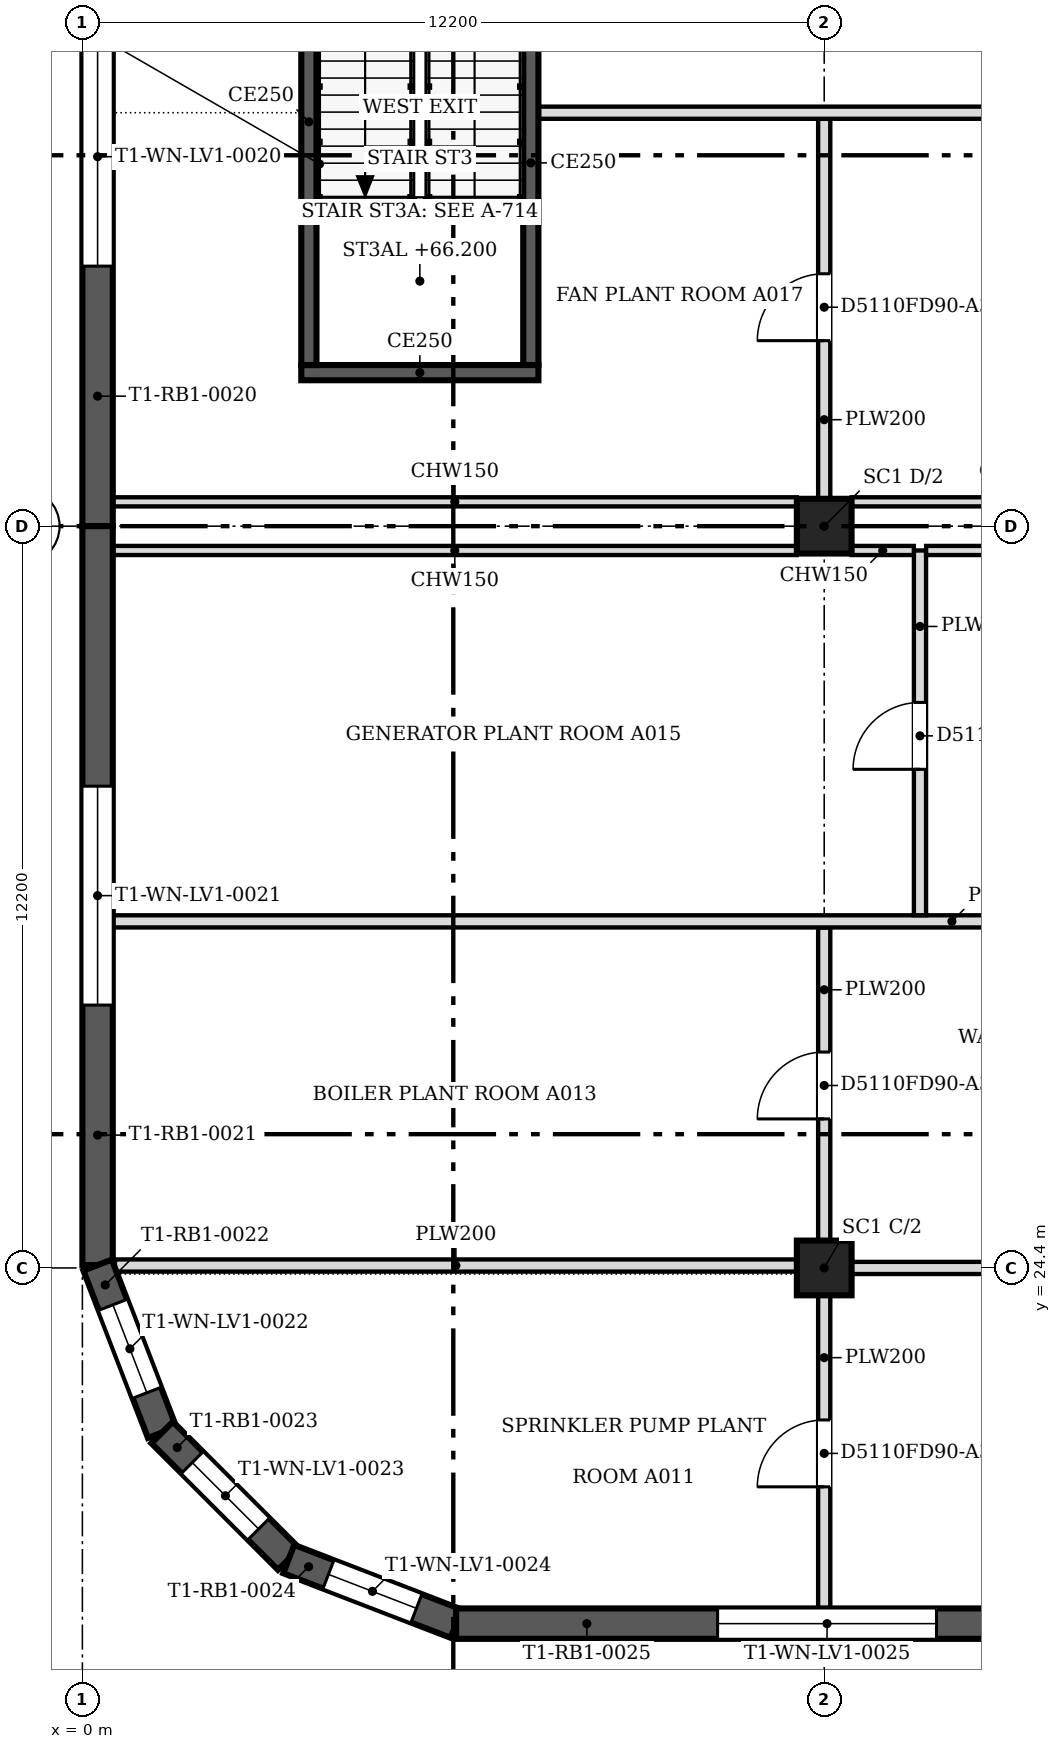
"""IFC4 building model, lengths in metres.
Left out: names, types, materials, properties, quantities, classifications, styles, units other than length and angle.
Written with IfcOpenShell. Run it as: python <this file> out.ifc"""

import sys

from ifc_helpers import new_model, si_unit, direction, frame, frame_2d, origin, origin_2d, place, context, subcontext, project, spatial, polyline, rectangle, outline, extrude, faceted_brep, source, transform, mapped, element, fill, save


model = new_model("IFC4")
c1 = context("Model", 3, precision=1e-05, world=origin(), true_north=direction((0.0, 1.0)))
c2 = subcontext(c1, "Body", "Model", "MODEL_VIEW")
j1 = project(units=[si_unit("LENGTHUNIT", "METRE"), si_unit("PLANEANGLEUNIT", "RADIAN")], contexts=[c1])
p1 = place(None, origin())
s1 = spatial("IfcSite", under=j1, at=p1, CompositionType="ELEMENT")
p2 = place(p1, origin())
s2 = spatial("IfcBuilding", under=s1, at=p2, CompositionType="ELEMENT")
p3 = place(p2, frame((0.0, 0.0, 63.8)))
s3 = spatial("IfcBuildingStorey", under=s2, at=p3, CompositionType="ELEMENT", Elevation=63.8)
for number, where, z_axis, x_axis in (
    (1, (12.2, 24.4, 0.0), (0.0, 0.0, 1.0), (1.0, 0.0, 0.0)),
    (2, (12.2, 36.6, 0.0), (0.0, 0.0, 1.0), (1.0, 0.0, 0.0)),
):
    element("IfcColumn", number, at=place(p3, frame(where, z_axis=z_axis, x_axis=x_axis)), inside=s3, PredefinedType="COLUMN", context=c2, shape_type="SweptSolid", body=[
        extrude(rectangle(XDim=0.9, YDim=0.9, at=origin_2d()), origin(), (0.0, 0.0, 1.0), 4.6),
    ])
m1 = source(origin(), c2, "Body", "Brep", [
    faceted_brep([(0.0, -0.25, 0.0), (12.154, -0.25, 0.0), (12.154, -0.25, 4.8), (0.0, -0.25, 4.8), (0.047, 0.25, 4.8), (12.154, 0.25, 4.8), (12.154, 0.25, 0.0), (0.047, 0.25, 0.0), (0.0, 0.0, 0.0), (0.0, 0.0, 4.8)], [[[0, 1, 2, 3]], [[4, 5, 6, 7]], [[7, 6, 1, 0, 8]], [[5, 4, 9, 3, 2]], [[8, 0, 3, 9]], [[7, 8, 9, 4]], [[1, 6, 5, 2]]]),
])
p4 = place(p3, frame((0.25, 48.753, 0.0), z_axis=(0.0, 0.0, 1.0), x_axis=(0.0, -1.0, 0.0)))
e3 = element("IfcWall", 3, at=p4, inside=s3, PredefinedType="SOLIDWALL", context=c2, shape_type="MappedRepresentation", body=[
    mapped(m1, transform((0.0, 0.0, 0.0), scale=1.0)),
])
m2 = source(origin(), c2, "Body", "SweptSolid", [
    extrude(outline(polyline([(4.277, 0.8), (7.877, 0.8), (7.877, 4.0), (4.277, 4.0), (4.277, 0.8)])), frame((0.0, 0.26, 0.0), z_axis=(0.0, -1.0, 0.0), x_axis=(1.0, 0.0, 0.0)), (0.0, 0.0, 1.0), 0.52),
])
p5 = place(p4, origin())
e4 = element("IfcOpeningElement", 4, at=p5, cuts=e3, PredefinedType="OPENING", context=c2, shape_type="MappedRepresentation", body=[
    mapped(m2, transform((0.0, 0.0, 0.0), scale=1.0)),
])
m3 = source(origin(), c2, "Body", "Brep", [
    faceted_brep([(0.0, -0.25, 0.0), (12.154, -0.25, 0.0), (12.154, -0.25, 4.8), (0.0, -0.25, 4.8), (0.0, 0.25, 4.8), (12.107, 0.25, 4.8), (12.107, 0.25, 0.0), (0.0, 0.25, 0.0), (12.154, -0.0, 0.0), (12.154, -0.0, 4.8)], [[[0, 1, 2, 3]], [[4, 5, 6, 7]], [[7, 6, 8, 1, 0]], [[9, 2, 1, 8]], [[5, 4, 3, 2, 9]], [[4, 7, 0, 3]], [[8, 6, 5, 9]]]),
])
p6 = place(p3, frame((0.25, 36.6, 0.0), z_axis=(0.0, 0.0, 1.0), x_axis=(0.0, -1.0, 0.0)))
e5 = element("IfcWall", 5, at=p6, inside=s3, PredefinedType="SOLIDWALL", context=c2, shape_type="MappedRepresentation", body=[
    mapped(m3, transform((0.0, 0.0, 0.0), scale=1.0)),
])
p7 = place(p6, origin())
e6 = element("IfcOpeningElement", 6, at=p7, cuts=e5, PredefinedType="OPENING", context=c2, shape_type="MappedRepresentation", body=[
    mapped(m2, transform((0.0, 0.0, 0.0), scale=1.0)),
])
m4 = source(origin(), c2, "Body", "Brep", [
    faceted_brep([(0.0, -0.25, 0.0), (2.95, -0.25, 0.0), (2.95, -0.25, 4.8), (0.0, -0.25, 4.8), (0.047, 0.25, 4.8), (2.898, 0.25, 4.8), (2.898, 0.25, 0.0), (0.047, 0.25, 0.0), (2.95, 0.0, 0.0), (0.0, 0.0, 0.0), (2.95, 0.0, 4.8), (0.0, 0.0, 4.8)], [[[0, 1, 2, 3]], [[4, 5, 6, 7]], [[7, 6, 8, 1, 0, 9]], [[10, 2, 1, 8]], [[5, 4, 11, 3, 2, 10]], [[9, 0, 3, 11]], [[7, 9, 11, 4]], [[8, 6, 5, 10]]]),
])
p8 = place(p3, frame((0.25, 24.447, 0.0), z_axis=(0.0, 0.0, 1.0), x_axis=(0.359877213415, -0.932999673775, 0.0)))
e7 = element("IfcWall", 7, at=p8, inside=s3, PredefinedType="SOLIDWALL", context=c2, shape_type="MappedRepresentation", body=[
    mapped(m4, transform((0.0, 0.0, 0.0), scale=1.0)),
])
m5 = source(origin(), c2, "Body", "SweptSolid", [
    extrude(outline(polyline([(0.7, 0.8), (2.25, 0.8), (2.25, 4.0), (0.7, 4.0), (0.7, 0.8)])), frame((0.0, 0.26, 0.0), z_axis=(0.0, -1.0, 0.0), x_axis=(1.0, 0.0, 0.0)), (0.0, 0.0, 1.0), 0.52),
])
p9 = place(p8, origin())
e8 = element("IfcOpeningElement", 8, at=p9, cuts=e7, PredefinedType="OPENING", context=c2, shape_type="MappedRepresentation", body=[
    mapped(m5, transform((0.0, 0.0, 0.0), scale=1.0)),
])
m6 = source(origin(), c2, "Body", "Brep", [
    faceted_brep([(0.0, -0.25, 0.0), (2.944, -0.25, 0.0), (2.944, -0.25, 4.8), (0.0, -0.25, 4.8), (0.053, 0.25, 4.8), (2.891, 0.25, 4.8), (2.891, 0.25, 0.0), (0.053, 0.25, 0.0), (2.944, 0.0, 0.0), (0.0, 0.0, 0.0), (2.944, 0.0, 4.8), (0.0, 0.0, 4.8)], [[[0, 1, 2, 3]], [[4, 5, 6, 7]], [[7, 6, 8, 1, 0, 9]], [[10, 2, 1, 8]], [[5, 4, 11, 3, 2, 10]], [[9, 0, 3, 11]], [[7, 9, 11, 4]], [[8, 6, 5, 10]]]),
])
p10 = place(p3, frame((1.312, 21.694, 0.0), z_axis=(0.0, 0.0, 1.0), x_axis=(0.707106781187, -0.707106781187, 0.0)))
e9 = element("IfcWall", 9, at=p10, inside=s3, PredefinedType="SOLIDWALL", context=c2, shape_type="MappedRepresentation", body=[
    mapped(m6, transform((0.0, 0.0, 0.0), scale=1.0)),
])
m7 = source(origin(), c2, "Body", "SweptSolid", [
    extrude(outline(polyline([(0.7, 0.8), (2.244, 0.8), (2.244, 4.0), (0.7, 4.0), (0.7, 0.8)])), frame((0.0, 0.26, 0.0), z_axis=(0.0, -1.0, 0.0), x_axis=(1.0, 0.0, 0.0)), (0.0, 0.0, 1.0), 0.52),
])
p11 = place(p10, origin())
e10 = element("IfcOpeningElement", 10, at=p11, cuts=e9, PredefinedType="OPENING", context=c2, shape_type="MappedRepresentation", body=[
    mapped(m7, transform((0.0, 0.0, 0.0), scale=1.0)),
])
m8 = source(origin(), c2, "Body", "Brep", [
    faceted_brep([(0.0, -0.25, 0.0), (2.95, -0.25, 0.0), (2.95, -0.25, 4.8), (0.0, -0.25, 4.8), (0.053, 0.25, 4.8), (2.904, 0.25, 4.8), (2.904, 0.25, 0.0), (0.053, 0.25, 0.0), (2.95, 0.0, 0.0), (0.0, 0.0, 0.0), (2.95, 0.0, 4.8), (0.0, 0.0, 4.8)], [[[0, 1, 2, 3]], [[4, 5, 6, 7]], [[7, 6, 8, 1, 0, 9]], [[10, 2, 1, 8]], [[5, 4, 11, 3, 2, 10]], [[9, 0, 3, 11]], [[7, 9, 11, 4]], [[8, 6, 5, 10]]]),
])
p12 = place(p3, frame((3.394, 19.612, 0.0), z_axis=(0.0, 0.0, 1.0), x_axis=(0.932999673775, -0.359877213415, 0.0)))
e11 = element("IfcWall", 11, at=p12, inside=s3, PredefinedType="SOLIDWALL", context=c2, shape_type="MappedRepresentation", body=[
    mapped(m8, transform((0.0, 0.0, 0.0), scale=1.0)),
])
p13 = place(p12, origin())
e12 = element("IfcOpeningElement", 12, at=p13, cuts=e11, PredefinedType="OPENING", context=c2, shape_type="MappedRepresentation", body=[
    mapped(m5, transform((0.0, 0.0, 0.0), scale=1.0)),
])
m9 = source(origin(), c2, "Body", "Brep", [
    faceted_brep([(0.0, -0.25, 0.0), (12.154, -0.25, 0.0), (12.154, -0.25, 4.8), (0.0, -0.25, 4.8), (0.047, 0.25, 4.8), (12.2, 0.25, 4.8), (12.2, 0.25, 0.0), (0.047, 0.25, 0.0), (12.2, -0.0, 0.0), (0.0, 0.0, 0.0), (12.2, -0.0, 4.8), (0.0, 0.0, 4.8)], [[[0, 1, 2, 3]], [[4, 5, 6, 7]], [[7, 6, 8, 1, 0, 9]], [[6, 5, 10, 8]], [[5, 4, 11, 3, 2, 10]], [[9, 0, 3, 11]], [[7, 9, 11, 4]], [[1, 8, 10, 2]]]),
])
p14 = place(p3, frame((6.146, 18.55, 0.0), z_axis=(0.0, 0.0, 1.0), x_axis=(1.0, 0.0, 0.0)))
e13 = element("IfcWall", 13, at=p14, inside=s3, PredefinedType="SOLIDWALL", context=c2, shape_type="MappedRepresentation", body=[
    mapped(m9, transform((0.0, 0.0, 0.0), scale=1.0)),
])
m10 = source(origin(), c2, "Body", "SweptSolid", [
    extrude(outline(polyline([(4.3, 0.8), (7.9, 0.8), (7.9, 4.0), (4.3, 4.0), (4.3, 0.8)])), frame((0.0, 0.26, 0.0), z_axis=(0.0, -1.0, 0.0), x_axis=(1.0, 0.0, 0.0)), (0.0, 0.0, 1.0), 0.52),
])
p15 = place(p14, origin())
e14 = element("IfcOpeningElement", 14, at=p15, cuts=e13, PredefinedType="OPENING", context=c2, shape_type="MappedRepresentation", body=[
    mapped(m10, transform((0.0, 0.0, 0.0), scale=1.0)),
])
p16 = place(p3, frame((7.5, 39.125, 0.0), z_axis=(0.0, 0.0, 1.0), x_axis=(-1.0, 0.0, 0.0)))
e15 = element("IfcWall", 15, at=p16, inside=s3, PredefinedType="SOLIDWALL", context=c2, shape_type="SweptSolid", body=[
    extrude(rectangle(XDim=3.9, YDim=0.25, at=frame_2d((1.95, 0.0))), origin(), (0.0, 0.0, 1.0), 4.8),
])
p17 = place(p3, frame((3.725, 39.25, 0.0), z_axis=(0.0, 0.0, 1.0), x_axis=(0.0, 1.0, 0.0)))
e16 = element("IfcWall", 16, at=p17, inside=s3, PredefinedType="SOLIDWALL", context=c2, shape_type="SweptSolid", body=[
    extrude(rectangle(XDim=8.0, YDim=0.25, at=frame_2d((4.0, 0.0))), origin(), (0.0, 0.0, 1.0), 4.8),
])
p18 = place(p3, frame((7.375, 47.25, 0.0), z_axis=(0.0, 0.0, 1.0), x_axis=(0.0, -1.0, 0.0)))
e17 = element("IfcWall", 17, at=p18, inside=s3, PredefinedType="SOLIDWALL", context=c2, shape_type="SweptSolid", body=[
    extrude(rectangle(XDim=8.0, YDim=0.25, at=frame_2d((4.0, 0.0))), origin(), (0.0, 0.0, 1.0), 4.8),
])
m11 = source(origin(), c2, "Body", "SweptSolid", [
    extrude(rectangle(XDim=1.2, YDim=2.1, at=frame_2d((0.6, 1.05))), frame((0.0, 0.135, 0.0), z_axis=(0.0, -1.0, 0.0), x_axis=(1.0, 0.0, 0.0)), (0.0, 0.0, 1.0), 0.27),
])
p19 = place(p18, frame((0.15, 0.0, 0.0)))
e18 = element("IfcOpeningElement", 18, at=p19, cuts=e17, PredefinedType="OPENING", context=c2, shape_type="MappedRepresentation", body=[
    mapped(m11, transform((0.0, 0.0, 0.0), scale=1.0)),
])
p20 = place(p3, frame((12.2, 18.8, 0.0), z_axis=(0.0, 0.0, 1.0), x_axis=(0.0, 1.0, 0.0)))
e19 = element("IfcWall", 19, at=p20, inside=s3, PredefinedType="PARTITIONING", context=c2, shape_type="SweptSolid", body=[
    extrude(rectangle(XDim=5.149, YDim=0.2, at=frame_2d((2.574, 0.0))), origin(), (0.0, 0.0, 1.0), 4.067),
])
m12 = source(origin(), c2, "Body", "SweptSolid", [
    extrude(rectangle(XDim=1.1, YDim=2.1, at=frame_2d((0.55, 1.05))), frame((0.0, 0.11, 0.0), z_axis=(0.0, -1.0, 0.0), x_axis=(1.0, 0.0, 0.0)), (0.0, 0.0, 1.0), 0.22),
])
p21 = place(p20, frame((2.0, 0.0, 0.0)))
e20 = element("IfcOpeningElement", 20, at=p21, cuts=e19, PredefinedType="OPENING", context=c2, shape_type="MappedRepresentation", body=[
    mapped(m12, transform((0.0, 0.0, 0.0), scale=1.0)),
])
p22 = place(p3, frame((0.536, 24.44, 0.0), z_axis=(0.0, 0.0, 1.0), x_axis=(1.0, 0.0, 0.0)))
e21 = element("IfcWall", 21, at=p22, inside=s3, PredefinedType="PARTITIONING", context=c2, shape_type="SweptSolid", body=[
    extrude(rectangle(XDim=11.213, YDim=0.2, at=frame_2d((5.606, 0.0))), origin(), (0.0, 0.0, 1.0), 4.067),
])
p23 = place(p3, frame((12.651, 24.4, 0.0), z_axis=(0.0, 0.0, 1.0), x_axis=(1.0, 0.0, 0.0)))
e22 = element("IfcWall", 22, at=p23, inside=s3, PredefinedType="PARTITIONING", context=c2, shape_type="SweptSolid", body=[
    extrude(rectangle(XDim=11.298, YDim=0.2, at=frame_2d((5.649, 0.0))), origin(), (0.0, 0.0, 1.0), 4.067),
])
p24 = place(p3, frame((12.2, 24.851, 0.0), z_axis=(0.0, 0.0, 1.0), x_axis=(0.0, 1.0, 0.0)))
e23 = element("IfcWall", 23, at=p24, inside=s3, PredefinedType="PARTITIONING", context=c2, shape_type="SweptSolid", body=[
    extrude(rectangle(XDim=5.148, YDim=0.2, at=frame_2d((2.574, 0.0))), origin(), (0.0, 0.0, 1.0), 4.067),
])
p25 = place(p24, frame((2.0, 0.0, 0.0)))
e24 = element("IfcOpeningElement", 24, at=p25, cuts=e23, PredefinedType="OPENING", context=c2, shape_type="MappedRepresentation", body=[
    mapped(m12, transform((0.0, 0.0, 0.0), scale=1.0)),
])
p26 = place(p3, frame((0.5, 30.1, 0.0), z_axis=(0.0, 0.0, 1.0), x_axis=(1.0, 0.0, 0.0)))
e25 = element("IfcWall", 25, at=p26, inside=s3, PredefinedType="PARTITIONING", context=c2, shape_type="SweptSolid", body=[
    extrude(rectangle(XDim=27.6, YDim=0.2, at=frame_2d((13.8, 0.0))), origin(), (0.0, 0.0, 1.0), 4.067),
])
p27 = place(p3, frame((13.775, 30.201, 0.0), z_axis=(0.0, 0.0, 1.0), x_axis=(0.0, 1.0, 0.0)))
e26 = element("IfcWall", 26, at=p27, inside=s3, PredefinedType="PARTITIONING", context=c2, shape_type="SweptSolid", body=[
    extrude(rectangle(XDim=5.999, YDim=0.2, at=frame_2d((3.0, 0.0))), origin(), (0.0, 0.0, 1.0), 4.067),
])
p28 = place(p27, frame((2.4, 0.0, 0.0)))
e27 = element("IfcOpeningElement", 27, at=p28, cuts=e26, PredefinedType="OPENING", context=c2, shape_type="MappedRepresentation", body=[
    mapped(m12, transform((0.0, 0.0, 0.0), scale=1.0)),
])
p29 = place(p3, frame((0.5, 36.2, 0.0), z_axis=(0.0, 0.0, 1.0), x_axis=(1.0, 0.0, 0.0)))
e28 = element("IfcWall", 28, at=p29, inside=s3, PredefinedType="PARTITIONING", context=c2, shape_type="SweptSolid", body=[
    extrude(rectangle(XDim=11.249, YDim=0.15, at=frame_2d((5.625, 0.0))), origin(), (0.0, 0.0, 1.0), 4.067),
])
p30 = place(p3, frame((12.651, 36.2, 0.0), z_axis=(0.0, 0.0, 1.0), x_axis=(1.0, 0.0, 0.0)))
e29 = element("IfcWall", 29, at=p30, inside=s3, PredefinedType="PARTITIONING", context=c2, shape_type="SweptSolid", body=[
    extrude(rectangle(XDim=1.023, YDim=0.15, at=frame_2d((0.512, 0.0))), origin(), (0.0, 0.0, 1.0), 4.067),
])
p31 = place(p3, frame((13.876, 36.2, 0.0), z_axis=(0.0, 0.0, 1.0), x_axis=(1.0, 0.0, 0.0)))
e30 = element("IfcWall", 30, at=p31, inside=s3, PredefinedType="PARTITIONING", context=c2, shape_type="SweptSolid", body=[
    extrude(rectangle(XDim=10.073, YDim=0.15, at=frame_2d((5.037, 0.0))), origin(), (0.0, 0.0, 1.0), 4.067),
])
p32 = place(p3, frame((0.5, 37.0, 0.0), z_axis=(0.0, 0.0, 1.0), x_axis=(1.0, 0.0, 0.0)))
e31 = element("IfcWall", 31, at=p32, inside=s3, PredefinedType="PARTITIONING", context=c2, shape_type="SweptSolid", body=[
    extrude(rectangle(XDim=11.249, YDim=0.15, at=frame_2d((5.625, 0.0))), origin(), (0.0, 0.0, 1.0), 4.067),
])
p33 = place(p3, frame((12.651, 37.0, 0.0), z_axis=(0.0, 0.0, 1.0), x_axis=(1.0, 0.0, 0.0)))
e32 = element("IfcWall", 32, at=p33, inside=s3, PredefinedType="PARTITIONING", context=c2, shape_type="SweptSolid", body=[
    extrude(rectangle(XDim=11.298, YDim=0.15, at=frame_2d((5.649, 0.0))), origin(), (0.0, 0.0, 1.0), 4.067),
])
p34 = place(p3, frame((12.2, 37.051, 0.0), z_axis=(0.0, 0.0, 1.0), x_axis=(0.0, 1.0, 0.0)))
e33 = element("IfcWall", 33, at=p34, inside=s3, PredefinedType="PARTITIONING", context=c2, shape_type="SweptSolid", body=[
    extrude(rectangle(XDim=6.248, YDim=0.2, at=frame_2d((3.124, 0.0))), origin(), (0.0, 0.0, 1.0), 4.067),
])
p35 = place(p34, frame((2.6, 0.0, 0.0)))
e34 = element("IfcOpeningElement", 34, at=p35, cuts=e33, PredefinedType="OPENING", context=c2, shape_type="MappedRepresentation", body=[
    mapped(m12, transform((0.0, 0.0, 0.0), scale=1.0)),
])
p36 = place(p3, frame((7.5, 43.4, 0.0), z_axis=(0.0, 0.0, 1.0), x_axis=(1.0, 0.0, 0.0)))
e35 = element("IfcWall", 35, at=p36, inside=s3, PredefinedType="PARTITIONING", context=c2, shape_type="SweptSolid", body=[
    extrude(rectangle(XDim=20.6, YDim=0.2, at=frame_2d((10.3, 0.0))), origin(), (0.0, 0.0, 1.0), 4.067),
])
m13 = source(origin(), c2, "Body", "SweptSolid", [
    extrude(outline(polyline([(4.277, 0.8), (7.877, 0.8), (7.877, 4.0), (4.277, 4.0), (4.277, 0.8)])), frame((0.0, 0.03, 0.0), z_axis=(0.0, -1.0, 0.0), x_axis=(1.0, 0.0, 0.0)), (0.0, 0.0, 1.0), 0.06),
])
p37 = place(p5, origin())
e36 = element("IfcWindow", 36, at=p37, inside=s3, PartitioningType="USERDEFINED", PredefinedType="WINDOW", context=c2, shape_type="MappedRepresentation", body=[
    mapped(m13, transform((0.0, 0.0, 0.0), scale=1.0)),
])
fill(e4, e36)
p38 = place(p7, origin())
e37 = element("IfcWindow", 37, at=p38, inside=s3, PartitioningType="USERDEFINED", PredefinedType="WINDOW", context=c2, shape_type="MappedRepresentation", body=[
    mapped(m13, transform((0.0, 0.0, 0.0), scale=1.0)),
])
fill(e6, e37)
m14 = source(origin(), c2, "Body", "SweptSolid", [
    extrude(outline(polyline([(0.7, 0.8), (2.25, 0.8), (2.25, 4.0), (0.7, 4.0), (0.7, 0.8)])), frame((0.0, 0.03, 0.0), z_axis=(0.0, -1.0, 0.0), x_axis=(1.0, 0.0, 0.0)), (0.0, 0.0, 1.0), 0.06),
])
p39 = place(p9, origin())
e38 = element("IfcWindow", 38, at=p39, inside=s3, PartitioningType="USERDEFINED", PredefinedType="WINDOW", context=c2, shape_type="MappedRepresentation", body=[
    mapped(m14, transform((0.0, 0.0, 0.0), scale=1.0)),
])
fill(e8, e38)
m15 = source(origin(), c2, "Body", "SweptSolid", [
    extrude(outline(polyline([(0.7, 0.8), (2.244, 0.8), (2.244, 4.0), (0.7, 4.0), (0.7, 0.8)])), frame((0.0, 0.03, 0.0), z_axis=(0.0, -1.0, 0.0), x_axis=(1.0, 0.0, 0.0)), (0.0, 0.0, 1.0), 0.06),
])
p40 = place(p11, origin())
e39 = element("IfcWindow", 39, at=p40, inside=s3, PartitioningType="USERDEFINED", PredefinedType="WINDOW", context=c2, shape_type="MappedRepresentation", body=[
    mapped(m15, transform((0.0, 0.0, 0.0), scale=1.0)),
])
fill(e10, e39)
p41 = place(p13, origin())
e40 = element("IfcWindow", 40, at=p41, inside=s3, PartitioningType="USERDEFINED", PredefinedType="WINDOW", context=c2, shape_type="MappedRepresentation", body=[
    mapped(m14, transform((0.0, 0.0, 0.0), scale=1.0)),
])
fill(e12, e40)
m16 = source(origin(), c2, "Body", "SweptSolid", [
    extrude(outline(polyline([(4.3, 0.8), (7.9, 0.8), (7.9, 4.0), (4.3, 4.0), (4.3, 0.8)])), frame((0.0, 0.03, 0.0), z_axis=(0.0, -1.0, 0.0), x_axis=(1.0, 0.0, 0.0)), (0.0, 0.0, 1.0), 0.06),
])
p42 = place(p15, origin())
e41 = element("IfcWindow", 41, at=p42, inside=s3, PartitioningType="USERDEFINED", PredefinedType="WINDOW", context=c2, shape_type="MappedRepresentation", body=[
    mapped(m16, transform((0.0, 0.0, 0.0), scale=1.0)),
])
fill(e14, e41)
m17 = source(origin(), c2, "Body", "SweptSolid", [
    extrude(rectangle(XDim=1.1, YDim=2.1, at=frame_2d((0.55, 1.05))), frame((0.0, 0.025, 0.0), z_axis=(0.0, -1.0, 0.0), x_axis=(1.0, 0.0, 0.0)), (0.0, 0.0, 1.0), 0.05),
])
p43 = place(p25, origin())
e42 = element("IfcDoor", 42, at=p43, inside=s3, OperationType="SINGLE_SWING_LEFT", PredefinedType="DOOR", context=c2, shape_type="MappedRepresentation", body=[
    mapped(m17, transform((0.0, 0.0, 0.0), scale=1.0)),
])
fill(e24, e42)
p44 = place(p21, origin())
e43 = element("IfcDoor", 43, at=p44, inside=s3, OperationType="SINGLE_SWING_LEFT", PredefinedType="DOOR", context=c2, shape_type="MappedRepresentation", body=[
    mapped(m17, transform((0.0, 0.0, 0.0), scale=1.0)),
])
fill(e20, e43)
p45 = place(p28, origin())
e44 = element("IfcDoor", 44, at=p45, inside=s3, OperationType="SINGLE_SWING_LEFT", PredefinedType="DOOR", context=c2, shape_type="MappedRepresentation", body=[
    mapped(m17, transform((0.0, 0.0, 0.0), scale=1.0)),
])
fill(e27, e44)
p46 = place(p35, origin())
e45 = element("IfcDoor", 45, at=p46, inside=s3, OperationType="SINGLE_SWING_LEFT", PredefinedType="DOOR", context=c2, shape_type="MappedRepresentation", body=[
    mapped(m17, transform((0.0, 0.0, 0.0), scale=1.0)),
])
fill(e34, e45)
save(model, sys.argv[1])
